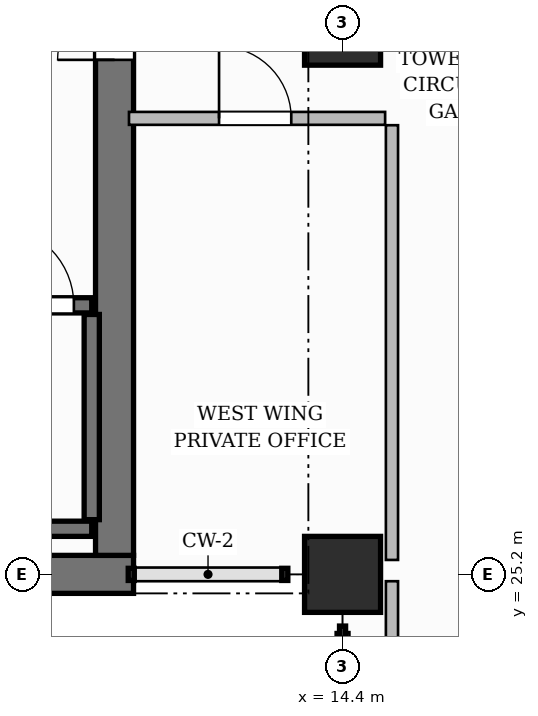
"""IFC4 building model, lengths in metres.
Left out: names, types, materials, properties, quantities, classifications, styles, units other than length and angle.
Written with IfcOpenShell. Run it as: python <this file> out.ifc"""

import sys

from ifc_helpers import new_model, si_unit, direction, frame, frame_2d, origin, origin_2d, place, context, subcontext, project, spatial, rectangle, extrude, source, transform, mapped, element, fill, save


model = new_model("IFC4")
c1 = context("Model", 3, precision=1e-05, world=origin(), true_north=direction((0.0, 1.0)))
c2 = subcontext(c1, "Body", "Model", "MODEL_VIEW")
j1 = project(units=[si_unit("LENGTHUNIT", "METRE"), si_unit("PLANEANGLEUNIT", "RADIAN")], contexts=[c1])
p1 = place(None, origin())
s1 = spatial("IfcSite", under=j1, at=p1, CompositionType="ELEMENT")
p2 = place(p1, origin())
s2 = spatial("IfcBuilding", under=s1, at=p2, CompositionType="ELEMENT")
p3 = place(p2, frame((0.0, 0.0, 177.25)))
s3 = spatial("IfcBuildingStorey", under=s2, at=p3, CompositionType="ELEMENT", Elevation=177.25)
p4 = place(p3, frame((3.35, 25.2, 0.0), z_axis=(0.0, 0.0, 1.0), x_axis=(1.0, 0.0, 0.0)))
e1 = element("IfcWall", 1, at=p4, inside=s3, PredefinedType="SHEAR", context=c2, shape_type="SweptSolid", body=[
    extrude(rectangle(XDim=8.3, YDim=0.5, at=frame_2d((4.15, 0.0))), origin(), (0.0, 0.0, 1.0), 3.85),
])
p5 = place(p3, frame((11.4, 25.45, 0.0), z_axis=(0.0, 0.0, 1.0), x_axis=(0.0, 1.0, 0.0)))
e2 = element("IfcWall", 2, at=p5, inside=s3, PredefinedType="SHEAR", context=c2, shape_type="SweptSolid", body=[
    extrude(rectangle(XDim=13.9, YDim=0.5, at=frame_2d((6.95, 0.0))), origin(), (0.0, 0.0, 1.0), 3.85),
])
p6 = place(p5, frame((6.52, 0.0, 0.0)))
e3 = element("IfcOpeningElement", 3, at=p6, cuts=e2, PredefinedType="OPENING", context=c2, shape_type="SweptSolid", body=[
    extrude(rectangle(XDim=1.5, YDim=2.2, at=frame_2d((0.75, 1.1))), frame((0.0, 0.26, 0.0), z_axis=(0.0, -1.0, 0.0), x_axis=(1.0, 0.0, 0.0)), (0.0, 0.0, 1.0), 0.52),
])
m1 = source(origin(), c2, "Body", "SweptSolid", [
    extrude(rectangle(XDim=1.0, YDim=1.0, at=origin_2d()), origin(), (0.0, 0.0, 1.0), 3.85),
])
for number, where, z_axis, x_axis in (
    (4, (14.4, 25.2, 0.0), (0.0, 0.0, 1.0), (1.0, 0.0, 0.0)),
    (5, (14.4, 32.4, 0.0), (0.0, 0.0, 1.0), (1.0, 0.0, 0.0)),
):
    element("IfcColumn", number, at=place(p3, frame(where, z_axis=z_axis, x_axis=x_axis)), inside=s3, PredefinedType="COLUMN", context=c2, shape_type="MappedRepresentation", body=[
        mapped(m1, transform((0.0, 0.0, 0.0), scale=1.0)),
    ])
p7 = place(p3, frame((4.0, 25.8, 0.0), z_axis=(0.0, 0.0, 1.0), x_axis=(1.0, 0.0, 0.0)))
e6 = element("IfcWall", 6, at=p7, inside=s3, PredefinedType="SHEAR", context=c2, shape_type="SweptSolid", body=[
    extrude(rectangle(XDim=7.1, YDim=0.2, at=frame_2d((3.55, 0.0))), origin(), (0.0, 0.0, 1.0), 3.85),
])
p8 = place(p3, frame((11.1, 25.92, 0.0), z_axis=(0.0, 0.0, 1.0), x_axis=(0.0, 1.0, 0.0)))
e7 = element("IfcWall", 7, at=p8, inside=s3, PredefinedType="SHEAR", context=c2, shape_type="SweptSolid", body=[
    extrude(rectangle(XDim=2.7, YDim=0.2, at=frame_2d((1.35, 0.0))), origin(), (0.0, 0.0, 1.0), 3.85),
])
p9 = place(p3, frame((4.0, 28.74, 0.0), z_axis=(0.0, 0.0, 1.0), x_axis=(1.0, 0.0, 0.0)))
e8 = element("IfcWall", 8, at=p9, inside=s3, PredefinedType="SHEAR", context=c2, shape_type="SweptSolid", body=[
    extrude(rectangle(XDim=7.1, YDim=0.2, at=frame_2d((3.55, 0.0))), origin(), (0.0, 0.0, 1.0), 3.85),
])
p10 = place(p9, frame((5.815, 0.0, 0.0)))
e9 = element("IfcOpeningElement", 9, at=p10, cuts=e8, PredefinedType="OPENING", context=c2, shape_type="SweptSolid", body=[
    extrude(rectangle(XDim=1.05, YDim=2.2, at=frame_2d((0.525, 1.1))), frame((0.0, 0.11, 0.0), z_axis=(0.0, -1.0, 0.0), x_axis=(1.0, 0.0, 0.0)), (0.0, 0.0, 1.0), 0.22),
])
p11 = place(p3, frame((15.05, 11.76, 0.0), z_axis=(0.0, 0.0, 1.0), x_axis=(0.0, 1.0, 0.0)))
e10 = element("IfcWall", 10, at=p11, inside=s3, PredefinedType="PARTITIONING", context=c2, shape_type="SweptSolid", body=[
    extrude(rectangle(XDim=13.35, YDim=0.16, at=frame_2d((6.675, 0.0))), origin(), (0.0, 0.0, 1.0), 3.6),
])
p12 = place(p3, frame((15.05, 25.39, 0.0), z_axis=(0.0, 0.0, 1.0), x_axis=(0.0, 1.0, 0.0)))
e11 = element("IfcWall", 11, at=p12, inside=s3, PredefinedType="PARTITIONING", context=c2, shape_type="SweptSolid", body=[
    extrude(rectangle(XDim=5.72, YDim=0.16, at=frame_2d((2.86, 0.0))), origin(), (0.0, 0.0, 1.0), 3.6),
])
p13 = place(p3, frame((11.59, 31.2, 0.0), z_axis=(0.0, 0.0, 1.0), x_axis=(1.0, 0.0, 0.0)))
e12 = element("IfcWall", 12, at=p13, inside=s3, PredefinedType="PARTITIONING", context=c2, shape_type="SweptSolid", body=[
    extrude(rectangle(XDim=3.37, YDim=0.17, at=frame_2d((1.685, 0.0))), origin(), (0.0, 0.0, 1.0), 3.6),
])
p14 = place(p13, frame((1.185, 0.0, 0.0)))
e13 = element("IfcOpeningElement", 13, at=p14, cuts=e12, PredefinedType="OPENING", context=c2, shape_type="SweptSolid", body=[
    extrude(rectangle(XDim=0.95, YDim=2.15, at=frame_2d((0.475, 1.075))), frame((0.0, 0.095, 0.0), z_axis=(0.0, -1.0, 0.0), x_axis=(1.0, 0.0, 0.0)), (0.0, 0.0, 1.0), 0.19),
])
m2 = source(origin(), c2, "Body", "SweptSolid", [
    extrude(rectangle(XDim=1.05, YDim=2.2, at=frame_2d((0.525, 1.1))), frame((0.0, 0.025, 0.0), z_axis=(0.0, -1.0, 0.0), x_axis=(1.0, 0.0, 0.0)), (0.0, 0.0, 1.0), 0.05),
])
p15 = place(p10, origin())
e14 = element("IfcDoor", 14, at=p15, inside=s3, OperationType="SINGLE_SWING_LEFT", PredefinedType="DOOR", context=c2, shape_type="MappedRepresentation", body=[
    mapped(m2, transform((0.0, 0.0, 0.0), scale=1.0)),
])
fill(e9, e14)
m3 = source(origin(), c2, "Body", "SweptSolid", [
    extrude(rectangle(XDim=1.5, YDim=2.2, at=frame_2d((0.75, 1.1))), frame((0.0, 0.025, 0.0), z_axis=(0.0, -1.0, 0.0), x_axis=(1.0, 0.0, 0.0)), (0.0, 0.0, 1.0), 0.05),
])
p16 = place(p6, origin())
e15 = element("IfcDoor", 15, at=p16, inside=s3, OperationType="DOUBLE_DOOR_SINGLE_SWING", PredefinedType="DOOR", context=c2, shape_type="MappedRepresentation", body=[
    mapped(m3, transform((0.0, 0.0, 0.0), scale=1.0)),
])
fill(e3, e15)
m4 = source(origin(), c2, "Body", "SweptSolid", [
    extrude(rectangle(XDim=0.95, YDim=2.15, at=frame_2d((0.475, 1.075))), frame((0.0, 0.025, 0.0), z_axis=(0.0, -1.0, 0.0), x_axis=(1.0, 0.0, 0.0)), (0.0, 0.0, 1.0), 0.05),
])
p17 = place(p14, origin())
e16 = element("IfcDoor", 16, at=p17, inside=s3, OperationType="SINGLE_SWING_LEFT", PredefinedType="DOOR", context=c2, shape_type="MappedRepresentation", body=[
    mapped(m4, transform((0.0, 0.0, 0.0), scale=1.0)),
])
fill(e13, e16)
save(model, sys.argv[1])
